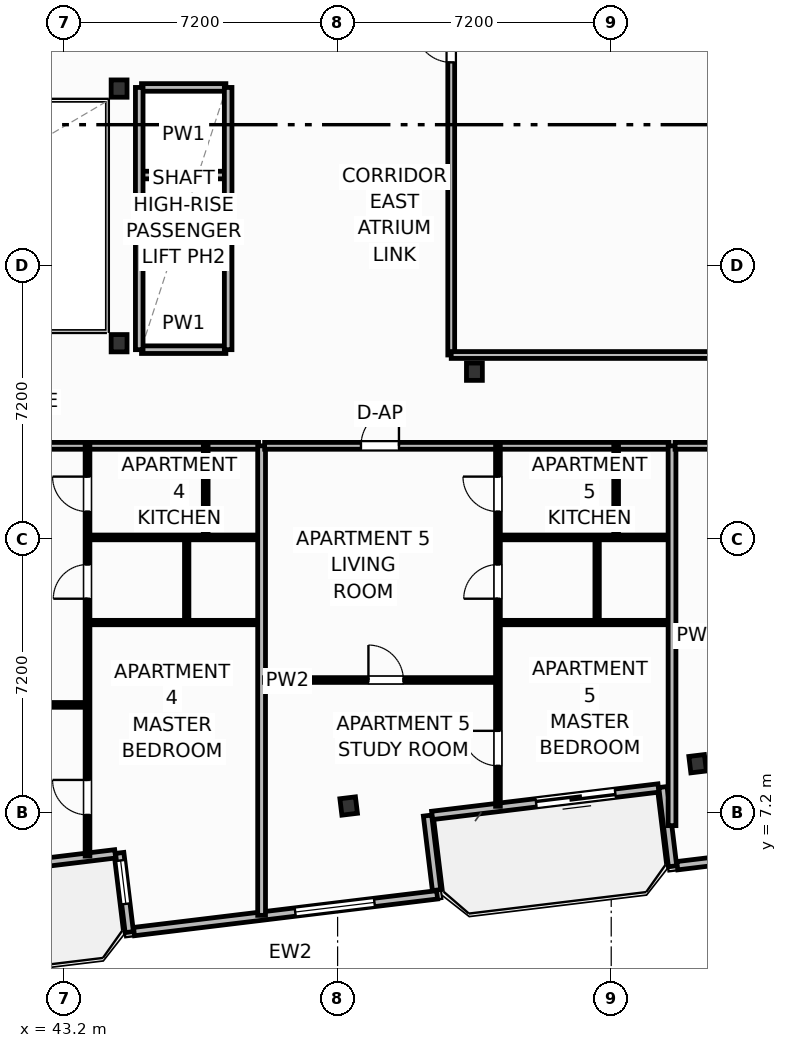
"""IFC4 building model, lengths in metres.
Left out: names, types, materials, properties, quantities, classifications, styles, units other than length and angle.
Written with IfcOpenShell. Run it as: python <this file> out.ifc"""

import sys

from ifc_helpers import new_model, si_unit, direction, frame, frame_2d, origin, origin_2d, place, context, subcontext, project, spatial, rectangle, i_section, extrude, element, fill, save


model = new_model("IFC4")
c1 = context("Model", 3, precision=1e-05, world=origin(), true_north=direction((0.0, 1.0)))
c2 = subcontext(c1, "Body", "Model", "MODEL_VIEW")
j1 = project(units=[si_unit("LENGTHUNIT", "METRE"), si_unit("PLANEANGLEUNIT", "RADIAN")], contexts=[c1])
p1 = place(None, origin())
s1 = spatial("IfcSite", under=j1, at=p1, CompositionType="ELEMENT")
p2 = place(p1, origin())
s2 = spatial("IfcBuilding", under=s1, at=p2, CompositionType="ELEMENT")
p3 = place(p2, frame((0.0, 0.0, 170.9)))
s3 = spatial("IfcBuildingStorey", under=s2, at=p3, CompositionType="ELEMENT", Elevation=170.9)
for number, where, z_axis, x_axis in (
    (1, (44.65, 19.55, 0.0), (0.0, 0.0, 1.0), (1.0, 0.0, 0.0)),
    (2, (44.65, 26.25, 0.0), (0.0, 0.0, 1.0), (1.0, 0.0, 0.0)),
    (3, (54.0, 18.8, 0.0), (0.0, 0.0, 1.0), (1.0, 0.0, 0.0)),
):
    element("IfcColumn", number, at=place(p3, frame(where, z_axis=z_axis, x_axis=x_axis)), inside=s3, PredefinedType="COLUMN", context=c2, shape_type="SweptSolid", body=[
        extrude(i_section(OverallWidth=0.418, OverallDepth=0.455, WebThickness=0.042, FlangeThickness=0.068, FilletRadius=0.025, at=origin_2d()), origin(), (0.0, 0.0, 1.0), 3.7),
    ])
for number, where, z_axis, x_axis in (
    (4, (50.691, 7.373, 0.0), (0.0, 0.0, 1.0), (0.993, 0.12, 0.0)),
    (5, (59.874, 8.486, 0.0), (0.0, 0.0, 1.0), (0.993, 0.12, 0.0)),
):
    element("IfcColumn", number, at=place(p3, frame(where, z_axis=z_axis, x_axis=x_axis)), inside=s3, PredefinedType="COLUMN", context=c2, shape_type="SweptSolid", body=[
        extrude(i_section(OverallWidth=0.412, OverallDepth=0.435, WebThickness=0.036, FlangeThickness=0.057, FilletRadius=0.025, at=origin_2d()), origin(), (0.0, 0.0, 1.0), 3.7),
    ])
p4 = place(p3, frame((44.548, 6.114, 0.0), z_axis=(0.0, 0.0, 1.0), x_axis=(-0.992735402148, -0.120318000826, 0.0)))
e6 = element("IfcWall", 6, at=p4, inside=s3, PredefinedType="SOLIDWALL", context=c2, shape_type="SweptSolid", body=[
    extrude(rectangle(XDim=6.0, YDim=0.22, at=frame_2d((3.0, 0.0))), origin(), (0.0, 0.0, 1.0), 2.73),
])
p5 = place(p4, frame((3.5, 0.0, 0.0)))
e7 = element("IfcOpeningElement", 7, at=p5, cuts=e6, PredefinedType="OPENING", context=c2, shape_type="SweptSolid", body=[
    extrude(rectangle(XDim=2.1, YDim=2.3, at=frame_2d((1.05, 1.15))), frame((0.0, 0.12, 0.0), z_axis=(0.0, -1.0, 0.0), x_axis=(1.0, 0.0, 0.0)), (0.0, 0.0, 1.0), 0.24),
])
p6 = place(p3, frame((58.843, 7.847, 0.0), z_axis=(0.0, 0.0, 1.0), x_axis=(-0.992729951822, -0.120362962556, 0.0)))
e8 = element("IfcWall", 8, at=p6, inside=s3, PredefinedType="SOLIDWALL", context=c2, shape_type="SweptSolid", body=[
    extrude(rectangle(XDim=6.0, YDim=0.22, at=frame_2d((3.0, 0.0))), origin(), (0.0, 0.0, 1.0), 2.73),
])
p7 = place(p6, frame((1.144, 0.0, 0.0)))
e9 = element("IfcOpeningElement", 9, at=p7, cuts=e8, PredefinedType="OPENING", context=c2, shape_type="SweptSolid", body=[
    extrude(rectangle(XDim=2.1, YDim=2.3, at=frame_2d((1.05, 1.15))), frame((0.0, 0.12, 0.0), z_axis=(0.0, -1.0, 0.0), x_axis=(1.0, 0.0, 0.0)), (0.0, 0.0, 1.0), 0.24),
])
p8 = place(p3, frame((44.666, 6.138, 0.0), z_axis=(0.0, 0.0, 1.0), x_axis=(0.120327895535, -0.992734202874, 0.0)))
e10 = element("IfcWall", 10, at=p8, inside=s3, PredefinedType="SOLIDWALL", context=c2, shape_type="SweptSolid", body=[
    extrude(rectangle(XDim=2.1, YDim=0.22, at=frame_2d((1.05, 0.0))), origin(), (0.0, 0.0, 1.0), 2.73),
])
p9 = place(p8, frame((0.2, 0.0, 0.8)))
e11 = element("IfcOpeningElement", 11, at=p9, cuts=e10, PredefinedType="OPENING", context=c2, shape_type="SweptSolid", body=[
    extrude(rectangle(XDim=1.15, YDim=1.4, at=frame_2d((0.575, 0.7))), frame((0.0, 0.12, 0.0), z_axis=(0.0, -1.0, 0.0), x_axis=(1.0, 0.0, 0.0)), (0.0, 0.0, 1.0), 0.24),
])
p10 = place(p3, frame((45.042, 4.069, 0.0), z_axis=(0.0, 0.0, 1.0), x_axis=(0.992731032022, 0.120354052946, 0.0)))
e12 = element("IfcWall", 12, at=p10, inside=s3, PredefinedType="SOLIDWALL", context=c2, shape_type="SweptSolid", body=[
    extrude(rectangle(XDim=8.035, YDim=0.22, at=frame_2d((4.018, 0.0))), origin(), (0.0, 0.0, 1.0), 2.73),
])
p11 = place(p10, frame((4.273, 0.0, 0.8)))
e13 = element("IfcOpeningElement", 13, at=p11, cuts=e12, PredefinedType="OPENING", context=c2, shape_type="SweptSolid", body=[
    extrude(rectangle(XDim=2.1, YDim=1.75, at=frame_2d((1.05, 0.875))), frame((0.0, 0.12, 0.0), z_axis=(0.0, -1.0, 0.0), x_axis=(1.0, 0.0, 0.0)), (0.0, 0.0, 1.0), 0.24),
])
p12 = place(p3, frame((53.004, 5.16, 0.0), z_axis=(0.0, 0.0, 1.0), x_axis=(-0.120397815541, 0.992725725472, 0.0)))
e14 = element("IfcWall", 14, at=p12, inside=s3, PredefinedType="SOLIDWALL", context=c2, shape_type="SweptSolid", body=[
    extrude(rectangle(XDim=1.975, YDim=0.22, at=frame_2d((0.988, 0.0))), origin(), (0.0, 0.0, 1.0), 2.73),
])
p13 = place(p3, frame((58.961, 7.872, 0.0), z_axis=(0.0, 0.0, 1.0), x_axis=(0.120327895535, -0.992734202874, 0.0)))
e15 = element("IfcWall", 15, at=p13, inside=s3, PredefinedType="SOLIDWALL", context=c2, shape_type="SweptSolid", body=[
    extrude(rectangle(XDim=2.1, YDim=0.22, at=frame_2d((1.05, 0.0))), origin(), (0.0, 0.0, 1.0), 2.73),
])
p14 = place(p3, frame((59.338, 5.802, 0.0), z_axis=(0.0, 0.0, 1.0), x_axis=(0.992731225757, 0.120352454927, 0.0)))
e16 = element("IfcWall", 16, at=p14, inside=s3, PredefinedType="SOLIDWALL", context=c2, shape_type="SweptSolid", body=[
    extrude(rectangle(XDim=12.447, YDim=0.22, at=frame_2d((6.224, 0.0))), origin(), (0.0, 0.0, 1.0), 2.73),
])
p15 = place(p14, frame((5.174, 0.0, 0.8)))
e17 = element("IfcOpeningElement", 17, at=p15, cuts=e16, PredefinedType="OPENING", context=c2, shape_type="SweptSolid", body=[
    extrude(rectangle(XDim=2.1, YDim=1.75, at=frame_2d((1.05, 0.875))), frame((0.0, 0.12, 0.0), z_axis=(0.0, -1.0, 0.0), x_axis=(1.0, 0.0, 0.0)), (0.0, 0.0, 1.0), 0.24),
])
p16 = place(p3, frame((37.68, 10.033, 0.0), z_axis=(0.0, 0.0, 1.0), x_axis=(1.0, 0.0, 0.0)))
e18 = element("IfcWall", 18, at=p16, inside=s3, PredefinedType="PARTITIONING", context=c2, shape_type="SweptSolid", body=[
    extrude(rectangle(XDim=6.069, YDim=0.125, at=frame_2d((3.035, 0.0))), origin(), (0.0, 0.0, 1.0), 3.45),
])
p17 = place(p16, frame((2.731, 0.0, 0.0)))
e19 = element("IfcOpeningElement", 19, at=p17, cuts=e18, PredefinedType="OPENING", context=c2, shape_type="SweptSolid", body=[
    extrude(rectangle(XDim=0.92, YDim=2.05, at=frame_2d((0.46, 1.025))), frame((0.0, 0.073, 0.0), z_axis=(0.0, -1.0, 0.0), x_axis=(1.0, 0.0, 0.0)), (0.0, 0.0, 1.0), 0.145),
])
p18 = place(p3, frame((37.68, 16.85, 0.0), z_axis=(0.0, 0.0, 1.0), x_axis=(1.0, 0.0, 0.0)))
e20 = element("IfcWall", 20, at=p18, inside=s3, PredefinedType="PARTITIONING", context=c2, shape_type="SweptSolid", body=[
    extrude(rectangle(XDim=10.64, YDim=0.18, at=frame_2d((5.32, 0.0))), origin(), (0.0, 0.0, 1.0), 3.45),
])
p19 = place(p18, frame((2.535, 0.0, 0.0)))
e21 = element("IfcOpeningElement", 21, at=p19, cuts=e20, PredefinedType="OPENING", context=c2, shape_type="SweptSolid", body=[
    extrude(rectangle(XDim=1.0, YDim=2.2, at=frame_2d((0.5, 1.1))), frame((0.0, 0.1, 0.0), z_axis=(0.0, -1.0, 0.0), x_axis=(1.0, 0.0, 0.0)), (0.0, 0.0, 1.0), 0.2),
])
p20 = place(p3, frame((43.819, 6.056, 0.0), z_axis=(0.0, 0.0, 1.0), x_axis=(0.0, 1.0, 0.0)))
e22 = element("IfcWall", 22, at=p20, inside=s3, PredefinedType="PARTITIONING", context=c2, shape_type="SweptSolid", body=[
    extrude(rectangle(XDim=10.794, YDim=0.125, at=frame_2d((5.397, 0.0))), origin(), (0.0, 0.0, 1.0), 2.662),
])
p21 = place(p20, frame((1.083, 0.0, 0.0)))
e23 = element("IfcOpeningElement", 23, at=p21, cuts=e22, PredefinedType="OPENING", context=c2, shape_type="SweptSolid", body=[
    extrude(rectangle(XDim=0.92, YDim=2.05, at=frame_2d((0.46, 1.025))), frame((0.0, 0.073, 0.0), z_axis=(0.0, -1.0, 0.0), x_axis=(1.0, 0.0, 0.0)), (0.0, 0.0, 1.0), 0.145),
])
p22 = place(p20, frame((6.771, 0.0, 0.0)))
e24 = element("IfcOpeningElement", 24, at=p22, cuts=e22, PredefinedType="OPENING", context=c2, shape_type="SweptSolid", body=[
    extrude(rectangle(XDim=0.9, YDim=2.05, at=frame_2d((0.45, 1.025))), frame((0.0, 0.073, 0.0), z_axis=(0.0, -1.0, 0.0), x_axis=(1.0, 0.0, 0.0)), (0.0, 0.0, 1.0), 0.145),
])
p23 = place(p20, frame((9.064, 0.0, 0.0)))
e25 = element("IfcOpeningElement", 25, at=p23, cuts=e22, PredefinedType="OPENING", context=c2, shape_type="SweptSolid", body=[
    extrude(rectangle(XDim=0.92, YDim=2.05, at=frame_2d((0.46, 1.025))), frame((0.0, 0.073, 0.0), z_axis=(0.0, -1.0, 0.0), x_axis=(1.0, 0.0, 0.0)), (0.0, 0.0, 1.0), 0.145),
])
p24 = place(p3, frame((43.889, 14.44, 0.0), z_axis=(0.0, 0.0, 1.0), x_axis=(1.0, 0.0, 0.0)))
e26 = element("IfcWall", 26, at=p24, inside=s3, PredefinedType="PARTITIONING", context=c2, shape_type="SweptSolid", body=[
    extrude(rectangle(XDim=4.431, YDim=0.125, at=frame_2d((2.215, 0.0))), origin(), (0.0, 0.0, 1.0), 3.45),
])
p25 = place(p3, frame((43.889, 12.2, 0.0), z_axis=(0.0, 0.0, 1.0), x_axis=(1.0, 0.0, 0.0)))
e27 = element("IfcWall", 27, at=p25, inside=s3, PredefinedType="PARTITIONING", context=c2, shape_type="SweptSolid", body=[
    extrude(rectangle(XDim=4.431, YDim=0.115, at=frame_2d((2.215, 0.0))), origin(), (0.0, 0.0, 1.0), 3.45),
])
p26 = place(p3, frame((46.929, 14.44, 0.0), z_axis=(0.0, 0.0, 1.0), x_axis=(0.0, 1.0, 0.0)))
e28 = element("IfcWall", 28, at=p26, inside=s3, PredefinedType="PARTITIONING", context=c2, shape_type="SweptSolid", body=[
    extrude(rectangle(XDim=2.41, YDim=0.125, at=frame_2d((1.205, 0.0))), origin(), (0.0, 0.0, 1.0), 3.45),
])
p27 = place(p3, frame((46.429, 12.2, 0.0), z_axis=(0.0, 0.0, 1.0), x_axis=(0.0, 1.0, 0.0)))
e29 = element("IfcWall", 29, at=p27, inside=s3, PredefinedType="PARTITIONING", context=c2, shape_type="SweptSolid", body=[
    extrude(rectangle(XDim=2.24, YDim=0.115, at=frame_2d((1.12, 0.0))), origin(), (0.0, 0.0, 1.0), 3.45),
])
p28 = place(p3, frame((48.4, 4.496, 0.0), z_axis=(0.0, 0.0, 1.0), x_axis=(0.0, 1.0, 0.0)))
e30 = element("IfcWall", 30, at=p28, inside=s3, PredefinedType="PARTITIONING", context=c2, shape_type="SweptSolid", body=[
    extrude(rectangle(XDim=12.354, YDim=0.205, at=frame_2d((6.177, 0.0))), origin(), (0.0, 0.0, 1.0), 3.45),
])
p29 = place(p3, frame((48.48, 10.688, 0.0), z_axis=(0.0, 0.0, 1.0), x_axis=(1.0, 0.0, 0.0)))
e31 = element("IfcWall", 31, at=p29, inside=s3, PredefinedType="PARTITIONING", context=c2, shape_type="SweptSolid", body=[
    extrude(rectangle(XDim=6.069, YDim=0.125, at=frame_2d((3.035, 0.0))), origin(), (0.0, 0.0, 1.0), 3.45),
])
p30 = place(p29, frame((2.731, 0.0, 0.0)))
e32 = element("IfcOpeningElement", 32, at=p30, cuts=e31, PredefinedType="OPENING", context=c2, shape_type="SweptSolid", body=[
    extrude(rectangle(XDim=0.92, YDim=2.05, at=frame_2d((0.46, 1.025))), frame((0.0, 0.073, 0.0), z_axis=(0.0, -1.0, 0.0), x_axis=(1.0, 0.0, 0.0)), (0.0, 0.0, 1.0), 0.145),
])
p31 = place(p3, frame((48.48, 16.85, 0.0), z_axis=(0.0, 0.0, 1.0), x_axis=(1.0, 0.0, 0.0)))
e33 = element("IfcWall", 33, at=p31, inside=s3, PredefinedType="PARTITIONING", context=c2, shape_type="SweptSolid", body=[
    extrude(rectangle(XDim=10.64, YDim=0.18, at=frame_2d((5.32, 0.0))), origin(), (0.0, 0.0, 1.0), 3.45),
])
p32 = place(p31, frame((2.535, 0.0, 0.0)))
e34 = element("IfcOpeningElement", 34, at=p32, cuts=e33, PredefinedType="OPENING", context=c2, shape_type="SweptSolid", body=[
    extrude(rectangle(XDim=1.0, YDim=2.2, at=frame_2d((0.5, 1.1))), frame((0.0, 0.1, 0.0), z_axis=(0.0, -1.0, 0.0), x_axis=(1.0, 0.0, 0.0)), (0.0, 0.0, 1.0), 0.2),
])
p33 = place(p3, frame((54.619, 7.365, 0.0), z_axis=(0.0, 0.0, 1.0), x_axis=(0.0, 1.0, 0.0)))
e35 = element("IfcWall", 35, at=p33, inside=s3, PredefinedType="PARTITIONING", context=c2, shape_type="SweptSolid", body=[
    extrude(rectangle(XDim=9.485, YDim=0.125, at=frame_2d((4.742, 0.0))), origin(), (0.0, 0.0, 1.0), 3.45),
])
p34 = place(p33, frame((1.065, 0.0, 0.0)))
e36 = element("IfcOpeningElement", 36, at=p34, cuts=e35, PredefinedType="OPENING", context=c2, shape_type="SweptSolid", body=[
    extrude(rectangle(XDim=0.92, YDim=2.05, at=frame_2d((0.46, 1.025))), frame((0.0, 0.073, 0.0), z_axis=(0.0, -1.0, 0.0), x_axis=(1.0, 0.0, 0.0)), (0.0, 0.0, 1.0), 0.145),
])
p35 = place(p33, frame((5.462, 0.0, 0.0)))
e37 = element("IfcOpeningElement", 37, at=p35, cuts=e35, PredefinedType="OPENING", context=c2, shape_type="SweptSolid", body=[
    extrude(rectangle(XDim=0.9, YDim=2.05, at=frame_2d((0.45, 1.025))), frame((0.0, 0.073, 0.0), z_axis=(0.0, -1.0, 0.0), x_axis=(1.0, 0.0, 0.0)), (0.0, 0.0, 1.0), 0.145),
])
p36 = place(p33, frame((7.755, 0.0, 0.0)))
e38 = element("IfcOpeningElement", 38, at=p36, cuts=e35, PredefinedType="OPENING", context=c2, shape_type="SweptSolid", body=[
    extrude(rectangle(XDim=0.92, YDim=2.05, at=frame_2d((0.46, 1.025))), frame((0.0, 0.073, 0.0), z_axis=(0.0, -1.0, 0.0), x_axis=(1.0, 0.0, 0.0)), (0.0, 0.0, 1.0), 0.145),
])
p37 = place(p3, frame((54.689, 14.44, 0.0), z_axis=(0.0, 0.0, 1.0), x_axis=(1.0, 0.0, 0.0)))
e39 = element("IfcWall", 39, at=p37, inside=s3, PredefinedType="PARTITIONING", context=c2, shape_type="SweptSolid", body=[
    extrude(rectangle(XDim=4.431, YDim=0.125, at=frame_2d((2.215, 0.0))), origin(), (0.0, 0.0, 1.0), 3.45),
])
p38 = place(p3, frame((54.689, 12.2, 0.0), z_axis=(0.0, 0.0, 1.0), x_axis=(1.0, 0.0, 0.0)))
e40 = element("IfcWall", 40, at=p38, inside=s3, PredefinedType="PARTITIONING", context=c2, shape_type="SweptSolid", body=[
    extrude(rectangle(XDim=4.431, YDim=0.115, at=frame_2d((2.215, 0.0))), origin(), (0.0, 0.0, 1.0), 3.45),
])
p39 = place(p3, frame((57.729, 14.44, 0.0), z_axis=(0.0, 0.0, 1.0), x_axis=(0.0, 1.0, 0.0)))
e41 = element("IfcWall", 41, at=p39, inside=s3, PredefinedType="PARTITIONING", context=c2, shape_type="SweptSolid", body=[
    extrude(rectangle(XDim=2.41, YDim=0.125, at=frame_2d((1.205, 0.0))), origin(), (0.0, 0.0, 1.0), 3.45),
])
p40 = place(p3, frame((57.229, 12.2, 0.0), z_axis=(0.0, 0.0, 1.0), x_axis=(0.0, 1.0, 0.0)))
e42 = element("IfcWall", 42, at=p40, inside=s3, PredefinedType="PARTITIONING", context=c2, shape_type="SweptSolid", body=[
    extrude(rectangle(XDim=2.24, YDim=0.115, at=frame_2d((1.12, 0.0))), origin(), (0.0, 0.0, 1.0), 3.45),
])
p41 = place(p3, frame((59.2, 6.856, 0.0), z_axis=(0.0, 0.0, 1.0), x_axis=(0.0, 1.0, 0.0)))
e43 = element("IfcWall", 43, at=p41, inside=s3, PredefinedType="PARTITIONING", context=c2, shape_type="SweptSolid", body=[
    extrude(rectangle(XDim=9.994, YDim=0.205, at=frame_2d((4.997, 0.0))), origin(), (0.0, 0.0, 1.0), 3.45),
])
p42 = place(p3, frame((59.28, 16.85, 0.0), z_axis=(0.0, 0.0, 1.0), x_axis=(1.0, 0.0, 0.0)))
e44 = element("IfcWall", 44, at=p42, inside=s3, PredefinedType="PARTITIONING", context=c2, shape_type="SweptSolid", body=[
    extrude(rectangle(XDim=16.322, YDim=0.18, at=frame_2d((8.161, 0.0))), origin(), (0.0, 0.0, 1.0), 3.45),
])
p43 = place(p42, frame((0.916, 0.0, 0.0)))
e45 = element("IfcOpeningElement", 45, at=p43, cuts=e44, PredefinedType="OPENING", context=c2, shape_type="SweptSolid", body=[
    extrude(rectangle(XDim=0.95, YDim=2.15, at=frame_2d((0.475, 1.075))), frame((0.0, 0.1, 0.0), z_axis=(0.0, -1.0, 0.0), x_axis=(1.0, 0.0, 0.0)), (0.0, 0.0, 1.0), 0.2),
])
p44 = place(p3, frame((53.39, 19.24, 0.0), z_axis=(0.0, 0.0, 1.0), x_axis=(0.0, 1.0, 0.0)))
e46 = element("IfcWall", 46, at=p44, inside=s3, PredefinedType="PARTITIONING", context=c2, shape_type="SweptSolid", body=[
    extrude(rectangle(XDim=20.06, YDim=0.18, at=frame_2d((10.03, 0.0))), origin(), (0.0, 0.0, 1.0), 3.45),
])
p45 = place(p44, frame((7.7, 0.0, 0.0)))
e47 = element("IfcOpeningElement", 47, at=p45, cuts=e46, PredefinedType="OPENING", context=c2, shape_type="SweptSolid", body=[
    extrude(rectangle(XDim=0.95, YDim=2.05, at=frame_2d((0.475, 1.025))), frame((0.0, 0.1, 0.0), z_axis=(0.0, -1.0, 0.0), x_axis=(1.0, 0.0, 0.0)), (0.0, 0.0, 1.0), 0.2),
])
p46 = place(p3, frame((53.39, 19.24, 0.0), z_axis=(0.0, 0.0, 1.0), x_axis=(1.0, 0.0, 0.0)))
e48 = element("IfcWall", 48, at=p46, inside=s3, PredefinedType="PARTITIONING", context=c2, shape_type="SweptSolid", body=[
    extrude(rectangle(XDim=21.922, YDim=0.18, at=frame_2d((10.961, 0.0))), origin(), (0.0, 0.0, 1.0), 2.662),
])
for number, where, z_axis, x_axis in (
    (49, (45.24, 21.675, 0.0), (0.0, 0.0, 1.0), (1.0, 0.0, 0.0)),
    (50, (45.24, 23.975, 0.0), (0.0, 0.0, 1.0), (1.0, 0.0, 0.0)),
):
    element("IfcWall", number, at=place(p3, frame(where, z_axis=z_axis, x_axis=x_axis)), inside=s3, PredefinedType="PARTITIONING", context=c2, shape_type="SweptSolid", body=[
        extrude(rectangle(XDim=2.22, YDim=0.2, at=frame_2d((1.11, 0.0))), origin(), (0.0, 0.0, 1.0), 3.45),
    ])
p47 = place(p3, frame((45.24, 19.38, 0.0), z_axis=(0.0, 0.0, 1.0), x_axis=(1.0, 0.0, 0.0)))
e51 = element("IfcWall", 51, at=p47, inside=s3, PredefinedType="PARTITIONING", context=c2, shape_type="SweptSolid", body=[
    extrude(rectangle(XDim=2.22, YDim=0.2, at=frame_2d((1.11, 0.0))), origin(), (0.0, 0.0, 1.0), 2.662),
])
p48 = place(p3, frame((45.24, 26.28, 0.0), z_axis=(0.0, 0.0, 1.0), x_axis=(1.0, 0.0, 0.0)))
e52 = element("IfcWall", 52, at=p48, inside=s3, PredefinedType="PARTITIONING", context=c2, shape_type="SweptSolid", body=[
    extrude(rectangle(XDim=2.22, YDim=0.2, at=frame_2d((1.11, 0.0))), origin(), (0.0, 0.0, 1.0), 3.45),
])
for number, where, z_axis, x_axis in (
    (53, (45.18, 19.38, 0.0), (0.0, 0.0, 1.0), (0.0, 1.0, 0.0)),
    (54, (47.52, 19.38, 0.0), (0.0, 0.0, 1.0), (0.0, 1.0, 0.0)),
):
    element("IfcWall", number, at=place(p3, frame(where, z_axis=z_axis, x_axis=x_axis)), inside=s3, PredefinedType="PARTITIONING", context=c2, shape_type="SweptSolid", body=[
        extrude(rectangle(XDim=6.9, YDim=0.2, at=frame_2d((3.45, 0.0))), origin(), (0.0, 0.0, 1.0), 3.45),
    ])
p49 = place(p7, origin())
e55 = element("IfcDoor", 55, at=p49, inside=s3, OperationType="SLIDING_TO_LEFT", PredefinedType="DOOR", context=c2, shape_type="SweptSolid", body=[
    extrude(rectangle(XDim=2.1, YDim=2.3, at=frame_2d((1.05, 1.15))), frame((0.0, 0.025, 0.0), z_axis=(0.0, -1.0, 0.0), x_axis=(1.0, 0.0, 0.0)), (0.0, 0.0, 1.0), 0.05),
])
fill(e9, e55)
p50 = place(p11, origin())
e56 = element("IfcWindow", 56, at=p50, inside=s3, PartitioningType="SINGLE_PANEL", PredefinedType="WINDOW", context=c2, shape_type="SweptSolid", body=[
    extrude(rectangle(XDim=2.1, YDim=1.75, at=frame_2d((1.05, 0.875))), frame((0.0, 0.03, 0.0), z_axis=(0.0, -1.0, 0.0), x_axis=(1.0, 0.0, 0.0)), (0.0, 0.0, 1.0), 0.06),
])
fill(e13, e56)
p51 = place(p21, origin())
e57 = element("IfcDoor", 57, at=p51, inside=s3, OperationType="SINGLE_SWING_RIGHT", PredefinedType="DOOR", context=c2, shape_type="SweptSolid", body=[
    extrude(rectangle(XDim=0.92, YDim=2.05, at=frame_2d((0.46, 1.025))), frame((0.0, 0.025, 0.0), z_axis=(0.0, -1.0, 0.0), x_axis=(1.0, 0.0, 0.0)), (0.0, 0.0, 1.0), 0.05),
])
fill(e23, e57)
p52 = place(p22, origin())
e58 = element("IfcDoor", 58, at=p52, inside=s3, OperationType="SINGLE_SWING_LEFT", PredefinedType="DOOR", context=c2, shape_type="SweptSolid", body=[
    extrude(rectangle(XDim=0.9, YDim=2.05, at=frame_2d((0.45, 1.025))), frame((0.0, 0.025, 0.0), z_axis=(0.0, -1.0, 0.0), x_axis=(1.0, 0.0, 0.0)), (0.0, 0.0, 1.0), 0.05),
])
fill(e24, e58)
p53 = place(p23, origin())
e59 = element("IfcDoor", 59, at=p53, inside=s3, OperationType="SINGLE_SWING_RIGHT", PredefinedType="DOOR", context=c2, shape_type="SweptSolid", body=[
    extrude(rectangle(XDim=0.92, YDim=2.05, at=frame_2d((0.46, 1.025))), frame((0.0, 0.025, 0.0), z_axis=(0.0, -1.0, 0.0), x_axis=(1.0, 0.0, 0.0)), (0.0, 0.0, 1.0), 0.05),
])
fill(e25, e59)
p54 = place(p30, origin())
e60 = element("IfcDoor", 60, at=p54, inside=s3, OperationType="SINGLE_SWING_LEFT", PredefinedType="DOOR", context=c2, shape_type="SweptSolid", body=[
    extrude(rectangle(XDim=0.92, YDim=2.05, at=frame_2d((0.46, 1.025))), frame((0.0, 0.025, 0.0), z_axis=(0.0, -1.0, 0.0), x_axis=(1.0, 0.0, 0.0)), (0.0, 0.0, 1.0), 0.05),
])
fill(e32, e60)
p55 = place(p32, origin())
e61 = element("IfcDoor", 61, at=p55, inside=s3, OperationType="SINGLE_SWING_RIGHT", PredefinedType="DOOR", context=c2, shape_type="SweptSolid", body=[
    extrude(rectangle(XDim=1.0, YDim=2.2, at=frame_2d((0.5, 1.1))), frame((0.0, 0.025, 0.0), z_axis=(0.0, -1.0, 0.0), x_axis=(1.0, 0.0, 0.0)), (0.0, 0.0, 1.0), 0.05),
])
fill(e34, e61)
p56 = place(p34, origin())
e62 = element("IfcDoor", 62, at=p56, inside=s3, OperationType="SINGLE_SWING_RIGHT", PredefinedType="DOOR", context=c2, shape_type="SweptSolid", body=[
    extrude(rectangle(XDim=0.92, YDim=2.05, at=frame_2d((0.46, 1.025))), frame((0.0, 0.025, 0.0), z_axis=(0.0, -1.0, 0.0), x_axis=(1.0, 0.0, 0.0)), (0.0, 0.0, 1.0), 0.05),
])
fill(e36, e62)
p57 = place(p35, origin())
e63 = element("IfcDoor", 63, at=p57, inside=s3, OperationType="SINGLE_SWING_LEFT", PredefinedType="DOOR", context=c2, shape_type="SweptSolid", body=[
    extrude(rectangle(XDim=0.9, YDim=2.05, at=frame_2d((0.45, 1.025))), frame((0.0, 0.025, 0.0), z_axis=(0.0, -1.0, 0.0), x_axis=(1.0, 0.0, 0.0)), (0.0, 0.0, 1.0), 0.05),
])
fill(e37, e63)
p58 = place(p36, origin())
e64 = element("IfcDoor", 64, at=p58, inside=s3, OperationType="SINGLE_SWING_RIGHT", PredefinedType="DOOR", context=c2, shape_type="SweptSolid", body=[
    extrude(rectangle(XDim=0.92, YDim=2.05, at=frame_2d((0.46, 1.025))), frame((0.0, 0.025, 0.0), z_axis=(0.0, -1.0, 0.0), x_axis=(1.0, 0.0, 0.0)), (0.0, 0.0, 1.0), 0.05),
])
fill(e38, e64)
p59 = place(p45, origin())
e65 = element("IfcDoor", 65, at=p59, inside=s3, OperationType="SINGLE_SWING_RIGHT", PredefinedType="DOOR", context=c2, shape_type="SweptSolid", body=[
    extrude(rectangle(XDim=0.95, YDim=2.05, at=frame_2d((0.475, 1.025))), frame((0.0, 0.025, 0.0), z_axis=(0.0, -1.0, 0.0), x_axis=(1.0, 0.0, 0.0)), (0.0, 0.0, 1.0), 0.05),
])
fill(e47, e65)
p60 = place(p9, origin())
e66 = element("IfcWindow", 66, at=p60, inside=s3, PartitioningType="SINGLE_PANEL", PredefinedType="WINDOW", context=c2, shape_type="SweptSolid", body=[
    extrude(rectangle(XDim=1.15, YDim=1.4, at=frame_2d((0.575, 0.7))), frame((0.0, 0.03, 0.0), z_axis=(0.0, -1.0, 0.0), x_axis=(1.0, 0.0, 0.0)), (0.0, 0.0, 1.0), 0.06),
])
fill(e11, e66)
save(model, sys.argv[1])
